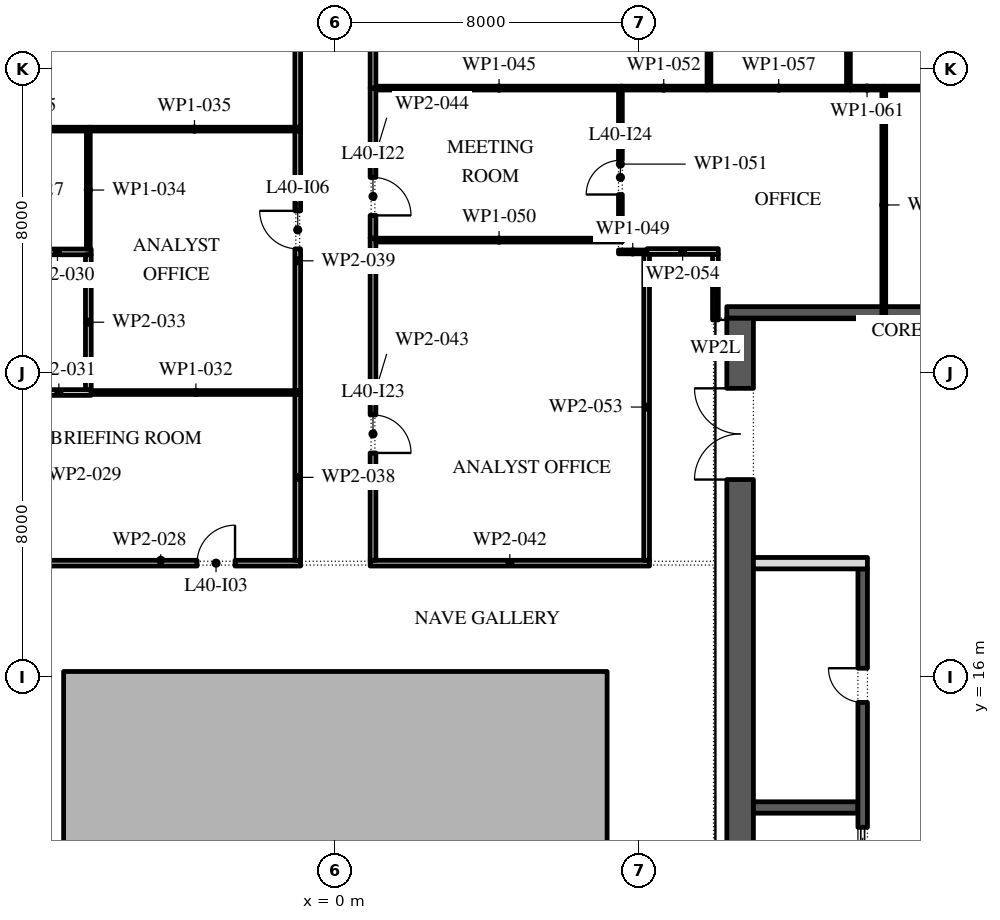
"""IFC4 building model, lengths in metres.
Left out: names, types, materials, properties, quantities, classifications, styles, units other than length and angle.
Written with IfcOpenShell. Run it as: python <this file> out.ifc"""

import sys

from ifc_helpers import new_model, si_unit, direction, frame, frame_2d, origin, place, context, subcontext, project, spatial, polyline, rectangle, outline, extrude, element, fill, save


model = new_model("IFC4")
c1 = context("Model", 3, precision=1e-05, world=origin(), true_north=direction((0.0, 1.0)))
c2 = subcontext(c1, "Body", "Model", "MODEL_VIEW")
j1 = project(units=[si_unit("LENGTHUNIT", "METRE"), si_unit("PLANEANGLEUNIT", "RADIAN")], contexts=[c1])
p1 = place(None, origin())
s1 = spatial("IfcSite", under=j1, at=p1, CompositionType="ELEMENT")
p2 = place(p1, origin())
s2 = spatial("IfcBuilding", under=s1, at=p2, CompositionType="ELEMENT")
p3 = place(p2, frame((0.0, 0.0, 184.2)))
s3 = spatial("IfcBuildingStorey", under=s2, at=p3, CompositionType="ELEMENT", Elevation=184.2)
p4 = place(p3, origin())
e1 = element("IfcWall", 1, at=p4, inside=s3, PredefinedType="STANDARD", context=c2, shape_type="SweptSolid", body=[
    extrude(outline(polyline([(-7.15, -2.15), (7.15, -2.15), (7.15, 16.15), (-7.15, 16.15), (-7.15, -2.15)]), holes=[polyline([(-7.0, -2.0), (-7.0, 16.0), (7.0, 16.0), (7.0, -2.0), (-7.0, -2.0)])]), origin(), (0.0, 0.0, 1.0), 4.0),
])
p5 = place(p3, frame((10.65, -2.45, 0.0), z_axis=(0.0, 0.0, 1.0), x_axis=(0.0, 1.0, 0.0)))
e2 = element("IfcWall", 2, at=p5, inside=s3, PredefinedType="SHEAR", context=c2, shape_type="SweptSolid", body=[
    extrude(rectangle(XDim=27.9, YDim=0.7, at=frame_2d((13.95, 0.0))), origin(), (0.0, 0.0, 1.0), 4.0),
])
p6 = place(p5, frame((23.65, 0.0, 0.0)))
e3 = element("IfcOpeningElement", 3, at=p6, cuts=e2, PredefinedType="OPENING", context=c2, shape_type="SweptSolid", body=[
    extrude(rectangle(XDim=2.4, YDim=2.1, at=frame_2d((1.2, 1.05))), frame((0.0, 0.36, 0.0), z_axis=(0.0, -1.0, 0.0), x_axis=(1.0, 0.0, 0.0)), (0.0, 0.0, 1.0), 0.72),
])
p7 = place(p5, frame((1.387, 0.0, 0.0)))
e4 = element("IfcOpeningElement", 4, at=p7, cuts=e2, PredefinedType="OPENING", context=c2, shape_type="SweptSolid", body=[
    extrude(rectangle(XDim=0.9, YDim=2.1, at=frame_2d((0.45, 1.05))), frame((0.0, 0.36, 0.0), z_axis=(0.0, -1.0, 0.0), x_axis=(1.0, 0.0, 0.0)), (0.0, 0.0, 1.0), 0.72),
])
p8 = place(p5, frame((4.562, 0.0, 0.0)))
e5 = element("IfcOpeningElement", 5, at=p8, cuts=e2, PredefinedType="OPENING", context=c2, shape_type="SweptSolid", body=[
    extrude(rectangle(XDim=1.0, YDim=2.1, at=frame_2d((0.5, 1.05))), frame((0.0, 0.36, 0.0), z_axis=(0.0, -1.0, 0.0), x_axis=(1.0, 0.0, 0.0)), (0.0, 0.0, 1.0), 0.72),
])
p9 = place(p3, frame((10.3, 25.6, 0.0), z_axis=(0.0, 0.0, 1.0), x_axis=(1.0, 0.0, 0.0)))
e6 = element("IfcWall", 6, at=p9, inside=s3, PredefinedType="SHEAR", context=c2, shape_type="SweptSolid", body=[
    extrude(rectangle(XDim=11.4, YDim=0.3, at=frame_2d((5.7, 0.0))), origin(), (0.0, 0.0, 1.0), 4.0),
])
p10 = place(p3, frame((11.0, 12.571, 0.0), z_axis=(0.0, 0.0, 1.0), x_axis=(1.0, 0.0, 0.0)))
e7 = element("IfcWall", 7, at=p10, inside=s3, PredefinedType="SHEAR", context=c2, shape_type="SweptSolid", body=[
    extrude(rectangle(XDim=2.75, YDim=0.3, at=frame_2d((1.375, 0.0))), origin(), (0.0, 0.0, 1.0), 4.0),
])
p11 = place(p3, frame((13.875, -2.45, 0.0), z_axis=(0.0, 0.0, 1.0), x_axis=(0.0, 1.0, 0.0)))
e8 = element("IfcWall", 8, at=p11, inside=s3, PredefinedType="SHEAR", context=c2, shape_type="SweptSolid", body=[
    extrude(rectangle(XDim=21.3, YDim=0.25, at=frame_2d((10.65, 0.0))), origin(), (0.0, 0.0, 1.0), 4.0),
])
p12 = place(p11, frame((17.786, 0.0, 0.0)))
e9 = element("IfcOpeningElement", 9, at=p12, cuts=e8, PredefinedType="OPENING", context=c2, shape_type="SweptSolid", body=[
    extrude(rectangle(XDim=0.9, YDim=2.1, at=frame_2d((0.45, 1.05))), frame((0.0, 0.135, 0.0), z_axis=(0.0, -1.0, 0.0), x_axis=(1.0, 0.0, 0.0)), (0.0, 0.0, 1.0), 0.27),
])
p13 = place(p11, frame((6.971, 0.0, 0.0)))
e10 = element("IfcOpeningElement", 10, at=p13, cuts=e8, PredefinedType="OPENING", context=c2, shape_type="SweptSolid", body=[
    extrude(rectangle(XDim=1.1, YDim=2.1, at=frame_2d((0.55, 1.05))), frame((0.0, 0.135, 0.0), z_axis=(0.0, -1.0, 0.0), x_axis=(1.0, 0.0, 0.0)), (0.0, 0.0, 1.0), 0.27),
])
p14 = place(p11, frame((9.114, 0.0, 0.0)))
e11 = element("IfcOpeningElement", 11, at=p14, cuts=e8, PredefinedType="OPENING", context=c2, shape_type="SweptSolid", body=[
    extrude(rectangle(XDim=1.1, YDim=2.1, at=frame_2d((0.55, 1.05))), frame((0.0, 0.135, 0.0), z_axis=(0.0, -1.0, 0.0), x_axis=(1.0, 0.0, 0.0)), (0.0, 0.0, 1.0), 0.27),
])
p15 = place(p11, frame((11.257, 0.0, 0.0)))
e12 = element("IfcOpeningElement", 12, at=p15, cuts=e8, PredefinedType="OPENING", context=c2, shape_type="SweptSolid", body=[
    extrude(rectangle(XDim=1.1, YDim=2.1, at=frame_2d((0.55, 1.05))), frame((0.0, 0.135, 0.0), z_axis=(0.0, -1.0, 0.0), x_axis=(1.0, 0.0, 0.0)), (0.0, 0.0, 1.0), 0.27),
])
p16 = place(p11, frame((13.4, 0.0, 0.0)))
e13 = element("IfcOpeningElement", 13, at=p16, cuts=e8, PredefinedType="OPENING", context=c2, shape_type="SweptSolid", body=[
    extrude(rectangle(XDim=1.1, YDim=2.1, at=frame_2d((0.55, 1.05))), frame((0.0, 0.135, 0.0), z_axis=(0.0, -1.0, 0.0), x_axis=(1.0, 0.0, 0.0)), (0.0, 0.0, 1.0), 0.27),
])
p17 = place(p3, frame((11.0, 19.0, 0.0), z_axis=(0.0, 0.0, 1.0), x_axis=(1.0, 0.0, 0.0)))
e14 = element("IfcWall", 14, at=p17, inside=s3, PredefinedType="PARTITIONING", context=c2, shape_type="SweptSolid", body=[
    extrude(rectangle(XDim=3.0, YDim=0.3, at=frame_2d((1.5, 0.0))), origin(), (0.0, 0.0, 1.0), 4.0),
])
p18 = place(p3, frame((-9.78, 30.42, 0.0), z_axis=(0.0, 0.0, 1.0), x_axis=(1.0, 0.0, 0.0)))
e15 = element("IfcWall", 15, at=p18, inside=s3, PredefinedType="PARTITIONING", context=c2, shape_type="SweptSolid", body=[
    extrude(rectangle(XDim=3.33, YDim=0.1, at=frame_2d((1.665, 0.0))), origin(), (0.0, 0.0, 1.0), 4.0),
])
p19 = place(p18, frame((1.15, 0.0, 0.0)))
e16 = element("IfcOpeningElement", 16, at=p19, cuts=e15, PredefinedType="OPENING", context=c2, shape_type="SweptSolid", body=[
    extrude(rectangle(XDim=0.9, YDim=2.1, at=frame_2d((0.45, 1.05))), frame((0.0, 0.06, 0.0), z_axis=(0.0, -1.0, 0.0), x_axis=(1.0, 0.0, 0.0)), (0.0, 0.0, 1.0), 0.12),
])
p20 = place(p3, frame((-8.275, 19.0, 0.0), z_axis=(0.0, 0.0, 1.0), x_axis=(1.0, 0.0, 0.0)))
e17 = element("IfcWall", 17, at=p20, inside=s3, PredefinedType="PARTITIONING", context=c2, shape_type="SweptSolid", body=[
    extrude(rectangle(XDim=7.36, YDim=0.15, at=frame_2d((3.68, 0.0))), origin(), (0.0, 0.0, 1.0), 4.0),
])
p21 = place(p20, frame((4.635, 0.0, 0.0)))
e18 = element("IfcOpeningElement", 18, at=p21, cuts=e17, PredefinedType="OPENING", context=c2, shape_type="SweptSolid", body=[
    extrude(rectangle(XDim=1.0, YDim=2.1, at=frame_2d((0.5, 1.05))), frame((0.0, 0.085, 0.0), z_axis=(0.0, -1.0, 0.0), x_axis=(1.0, 0.0, 0.0)), (0.0, 0.0, 1.0), 0.17),
])
p22 = place(p3, frame((-8.2, 27.19, 0.0), z_axis=(0.0, 0.0, 1.0), x_axis=(1.0, 0.0, 0.0)))
e19 = element("IfcWall", 19, at=p22, inside=s3, PredefinedType="PARTITIONING", context=c2, shape_type="SweptSolid", body=[
    extrude(rectangle(XDim=1.775, YDim=0.15, at=frame_2d((0.887, 0.0))), origin(), (0.0, 0.0, 1.0), 4.0),
])
p23 = place(p3, frame((-6.425, 23.49, 0.0), z_axis=(0.0, 0.0, 1.0), x_axis=(-1.0, 0.0, 0.0)))
e20 = element("IfcWall", 20, at=p23, inside=s3, PredefinedType="PARTITIONING", context=c2, shape_type="SweptSolid", body=[
    extrude(rectangle(XDim=1.7, YDim=0.15, at=frame_2d((0.85, 0.0))), origin(), (0.0, 0.0, 1.0), 4.0),
])
p24 = place(p3, frame((-6.425, 23.49, 0.0), z_axis=(0.0, 0.0, 1.0), x_axis=(1.0, 0.0, 0.0)))
e21 = element("IfcWall", 21, at=p24, inside=s3, PredefinedType="PARTITIONING", context=c2, shape_type="SweptSolid", body=[
    extrude(rectangle(XDim=5.51, YDim=0.1, at=frame_2d((2.755, 0.0))), origin(), (0.0, 0.0, 1.0), 4.0),
])
p25 = place(p3, frame((-6.5, 27.115, 0.0), z_axis=(0.0, 0.0, 1.0), x_axis=(0.0, -1.0, 0.0)))
e22 = element("IfcWall", 22, at=p25, inside=s3, PredefinedType="PARTITIONING", context=c2, shape_type="SweptSolid", body=[
    extrude(rectangle(XDim=3.55, YDim=0.15, at=frame_2d((1.775, 0.0))), origin(), (0.0, 0.0, 1.0), 4.0),
])
p26 = place(p3, frame((-6.5, 30.37, 0.0), z_axis=(0.0, 0.0, 1.0), x_axis=(0.0, -1.0, 0.0)))
e23 = element("IfcWall", 23, at=p26, inside=s3, PredefinedType="PARTITIONING", context=c2, shape_type="SweptSolid", body=[
    extrude(rectangle(XDim=3.105, YDim=0.1, at=frame_2d((1.553, 0.0))), origin(), (0.0, 0.0, 1.0), 4.0),
])
p27 = place(p3, frame((-6.5, 30.42, 0.0), z_axis=(0.0, 0.0, 1.0), x_axis=(1.0, 0.0, 0.0)))
e24 = element("IfcWall", 24, at=p27, inside=s3, PredefinedType="PARTITIONING", context=c2, shape_type="SweptSolid", body=[
    extrude(rectangle(XDim=5.585, YDim=0.1, at=frame_2d((2.792, 0.0))), origin(), (0.0, 0.0, 1.0), 4.0),
])
p28 = place(p3, frame((-0.99, 19.075, 0.0), z_axis=(0.0, 0.0, 1.0), x_axis=(0.0, 1.0, 0.0)))
e25 = element("IfcWall", 25, at=p28, inside=s3, PredefinedType="PARTITIONING", context=c2, shape_type="SweptSolid", body=[
    extrude(rectangle(XDim=4.365, YDim=0.15, at=frame_2d((2.183, 0.0))), origin(), (0.0, 0.0, 1.0), 4.0),
])
p29 = place(p3, frame((-0.99, 23.54, 0.0), z_axis=(0.0, 0.0, 1.0), x_axis=(0.0, 1.0, 0.0)))
e26 = element("IfcWall", 26, at=p29, inside=s3, PredefinedType="PARTITIONING", context=c2, shape_type="SweptSolid", body=[
    extrude(rectangle(XDim=6.83, YDim=0.15, at=frame_2d((3.415, 0.0))), origin(), (0.0, 0.0, 1.0), 4.0),
])
p30 = place(p29, frame((3.73, 0.0, 0.0)))
e27 = element("IfcOpeningElement", 27, at=p30, cuts=e26, PredefinedType="OPENING", context=c2, shape_type="SweptSolid", body=[
    extrude(rectangle(XDim=1.0, YDim=2.1, at=frame_2d((0.5, 1.05))), frame((0.0, 0.085, 0.0), z_axis=(0.0, -1.0, 0.0), x_axis=(1.0, 0.0, 0.0)), (0.0, 0.0, 1.0), 0.17),
])
p31 = place(p3, frame((-0.99, 30.47, 0.0), z_axis=(0.0, 0.0, 1.0), x_axis=(0.0, 1.0, 0.0)))
e28 = element("IfcWall", 28, at=p31, inside=s3, PredefinedType="PARTITIONING", context=c2, shape_type="SweptSolid", body=[
    extrude(rectangle(XDim=10.826, YDim=0.15, at=frame_2d((5.413, 0.0))), origin(), (0.0, 0.0, 1.0), 4.0),
])
p32 = place(p31, frame((3.9, 0.0, 0.0)))
e29 = element("IfcOpeningElement", 29, at=p32, cuts=e28, PredefinedType="OPENING", context=c2, shape_type="SweptSolid", body=[
    extrude(rectangle(XDim=1.0, YDim=2.1, at=frame_2d((0.5, 1.05))), frame((0.0, 0.085, 0.0), z_axis=(0.0, -1.0, 0.0), x_axis=(1.0, 0.0, 0.0)), (0.0, 0.0, 1.0), 0.17),
])
p33 = place(p3, frame((0.915, 19.0, 0.0), z_axis=(0.0, 0.0, 1.0), x_axis=(1.0, 0.0, 0.0)))
e30 = element("IfcWall", 30, at=p33, inside=s3, PredefinedType="PARTITIONING", context=c2, shape_type="SweptSolid", body=[
    extrude(rectangle(XDim=7.35, YDim=0.15, at=frame_2d((3.675, 0.0))), origin(), (0.0, 0.0, 1.0), 4.0),
])
p34 = place(p3, frame((0.99, 27.55, 0.0), z_axis=(0.0, 0.0, 1.0), x_axis=(0.0, -1.0, 0.0)))
e31 = element("IfcWall", 31, at=p34, inside=s3, PredefinedType="PARTITIONING", context=c2, shape_type="SweptSolid", body=[
    extrude(rectangle(XDim=8.475, YDim=0.15, at=frame_2d((4.238, 0.0))), origin(), (0.0, 0.0, 1.0), 4.0),
])
p35 = place(p34, frame((4.65, 0.0, 0.0)))
e32 = element("IfcOpeningElement", 32, at=p35, cuts=e31, PredefinedType="OPENING", context=c2, shape_type="SweptSolid", body=[
    extrude(rectangle(XDim=1.0, YDim=2.1, at=frame_2d((0.5, 1.05))), frame((0.0, 0.085, 0.0), z_axis=(0.0, -1.0, 0.0), x_axis=(1.0, 0.0, 0.0)), (0.0, 0.0, 1.0), 0.17),
])
p36 = place(p3, frame((0.99, 31.5, 0.0), z_axis=(0.0, 0.0, 1.0), x_axis=(0.0, -1.0, 0.0)))
e33 = element("IfcWall", 33, at=p36, inside=s3, PredefinedType="PARTITIONING", context=c2, shape_type="SweptSolid", body=[
    extrude(rectangle(XDim=3.95, YDim=0.15, at=frame_2d((1.975, 0.0))), origin(), (0.0, 0.0, 1.0), 4.0),
])
p37 = place(p36, frame((2.35, 0.0, 0.0)))
e34 = element("IfcOpeningElement", 34, at=p37, cuts=e33, PredefinedType="OPENING", context=c2, shape_type="SweptSolid", body=[
    extrude(rectangle(XDim=1.0, YDim=2.1, at=frame_2d((0.5, 1.05))), frame((0.0, 0.085, 0.0), z_axis=(0.0, -1.0, 0.0), x_axis=(1.0, 0.0, 0.0)), (0.0, 0.0, 1.0), 0.17),
])
p38 = place(p3, frame((1.065, 31.5, 0.0), z_axis=(0.0, 0.0, 1.0), x_axis=(1.0, 0.0, 0.0)))
e35 = element("IfcWall", 35, at=p38, inside=s3, PredefinedType="PARTITIONING", context=c2, shape_type="SweptSolid", body=[
    extrude(rectangle(XDim=6.485, YDim=0.1, at=frame_2d((3.243, 0.0))), origin(), (0.0, 0.0, 1.0), 4.0),
])
p39 = place(p3, frame((0.99, 40.05, 0.0), z_axis=(0.0, 0.0, 1.0), x_axis=(0.0, -1.0, 0.0)))
e36 = element("IfcWall", 36, at=p39, inside=s3, PredefinedType="PARTITIONING", context=c2, shape_type="SweptSolid", body=[
    extrude(rectangle(XDim=8.55, YDim=0.15, at=frame_2d((4.275, 0.0))), origin(), (0.0, 0.0, 1.0), 4.0),
])
p40 = place(p39, frame((2.9, 0.0, 0.0)))
e37 = element("IfcOpeningElement", 37, at=p40, cuts=e36, PredefinedType="OPENING", context=c2, shape_type="SweptSolid", body=[
    extrude(rectangle(XDim=1.0, YDim=2.1, at=frame_2d((0.5, 1.05))), frame((0.0, 0.085, 0.0), z_axis=(0.0, -1.0, 0.0), x_axis=(1.0, 0.0, 0.0)), (0.0, 0.0, 1.0), 0.17),
])
p41 = place(p3, frame((7.45, 27.19, 0.0), z_axis=(0.0, 0.0, 1.0), x_axis=(1.0, 0.0, 0.0)))
e38 = element("IfcWall", 38, at=p41, inside=s3, PredefinedType="PARTITIONING", context=c2, shape_type="SweptSolid", body=[
    extrude(rectangle(XDim=0.75, YDim=0.1, at=frame_2d((0.375, 0.0))), origin(), (0.0, 0.0, 1.0), 4.0),
])
p42 = place(p3, frame((7.55, 27.5, 0.0), z_axis=(0.0, 0.0, 1.0), x_axis=(-1.0, 0.0, 0.0)))
e39 = element("IfcWall", 39, at=p42, inside=s3, PredefinedType="PARTITIONING", context=c2, shape_type="SweptSolid", body=[
    extrude(rectangle(XDim=6.485, YDim=0.1, at=frame_2d((3.243, 0.0))), origin(), (0.0, 0.0, 1.0), 4.0),
])
p43 = place(p3, frame((7.5, 31.45, 0.0), z_axis=(0.0, 0.0, 1.0), x_axis=(0.0, -1.0, 0.0)))
e40 = element("IfcWall", 40, at=p43, inside=s3, PredefinedType="PARTITIONING", context=c2, shape_type="SweptSolid", body=[
    extrude(rectangle(XDim=3.9, YDim=0.1, at=frame_2d((1.95, 0.0))), origin(), (0.0, 0.0, 1.0), 4.0),
])
p44 = place(p43, frame((1.85, 0.0, 0.0)))
e41 = element("IfcOpeningElement", 41, at=p44, cuts=e40, PredefinedType="OPENING", context=c2, shape_type="SweptSolid", body=[
    extrude(rectangle(XDim=0.9, YDim=2.1, at=frame_2d((0.45, 1.05))), frame((0.0, 0.06, 0.0), z_axis=(0.0, -1.0, 0.0), x_axis=(1.0, 0.0, 0.0)), (0.0, 0.0, 1.0), 0.12),
])
p45 = place(p3, frame((7.5, 31.5, 0.0), z_axis=(0.0, 0.0, 1.0), x_axis=(1.0, 0.0, 0.0)))
e42 = element("IfcWall", 42, at=p45, inside=s3, PredefinedType="PARTITIONING", context=c2, shape_type="SweptSolid", body=[
    extrude(rectangle(XDim=2.28, YDim=0.1, at=frame_2d((1.14, 0.0))), origin(), (0.0, 0.0, 1.0), 4.0),
])
p46 = place(p3, frame((8.19, 19.075, 0.0), z_axis=(0.0, 0.0, 1.0), x_axis=(0.0, 1.0, 0.0)))
e43 = element("IfcWall", 43, at=p46, inside=s3, PredefinedType="PARTITIONING", context=c2, shape_type="SweptSolid", body=[
    extrude(rectangle(XDim=8.065, YDim=0.15, at=frame_2d((4.032, 0.0))), origin(), (0.0, 0.0, 1.0), 4.0),
])
p47 = place(p3, frame((8.2, 27.2, 0.0), z_axis=(0.0, 0.0, 1.0), x_axis=(1.0, 0.0, 0.0)))
e44 = element("IfcWall", 44, at=p47, inside=s3, PredefinedType="PARTITIONING", context=c2, shape_type="SweptSolid", body=[
    extrude(rectangle(XDim=1.875, YDim=0.15, at=frame_2d((0.938, 0.0))), origin(), (0.0, 0.0, 1.0), 4.0),
])
p48 = place(p3, frame((9.78, 31.5, 0.0), z_axis=(0.0, 0.0, 1.0), x_axis=(1.0, 0.0, 0.0)))
e45 = element("IfcWall", 45, at=p48, inside=s3, PredefinedType="PARTITIONING", context=c2, shape_type="SweptSolid", body=[
    extrude(rectangle(XDim=3.77, YDim=0.1, at=frame_2d((1.885, 0.0))), origin(), (0.0, 0.0, 1.0), 4.0),
])
p49 = place(p3, frame((9.83, 39.95, 0.0), z_axis=(0.0, 0.0, 1.0), x_axis=(0.0, -1.0, 0.0)))
e46 = element("IfcWall", 46, at=p49, inside=s3, PredefinedType="PARTITIONING", context=c2, shape_type="SweptSolid", body=[
    extrude(rectangle(XDim=8.4, YDim=0.1, at=frame_2d((4.2, 0.0))), origin(), (0.0, 0.0, 1.0), 4.0),
])
p50 = place(p49, frame((4.6, 0.0, 0.0)))
e47 = element("IfcOpeningElement", 47, at=p50, cuts=e46, PredefinedType="OPENING", context=c2, shape_type="SweptSolid", body=[
    extrude(rectangle(XDim=0.9, YDim=2.1, at=frame_2d((0.45, 1.05))), frame((0.0, 0.06, 0.0), z_axis=(0.0, -1.0, 0.0), x_axis=(1.0, 0.0, 0.0)), (0.0, 0.0, 1.0), 0.12),
])
p51 = place(p3, frame((10.0, 27.125, 0.0), z_axis=(0.0, 0.0, 1.0), x_axis=(0.0, -1.0, 0.0)))
e48 = element("IfcWall", 48, at=p51, inside=s3, PredefinedType="PARTITIONING", context=c2, shape_type="SweptSolid", body=[
    extrude(rectangle(XDim=1.725, YDim=0.15, at=frame_2d((0.863, 0.0))), origin(), (0.0, 0.0, 1.0), 3.02),
])
p52 = place(p3, frame((13.55, 31.5, 0.0), z_axis=(0.0, 0.0, 1.0), x_axis=(1.0, 0.0, 0.0)))
e49 = element("IfcWall", 49, at=p52, inside=s3, PredefinedType="PARTITIONING", context=c2, shape_type="SweptSolid", body=[
    extrude(rectangle(XDim=0.88, YDim=0.1, at=frame_2d((0.44, 0.0))), origin(), (0.0, 0.0, 1.0), 4.0),
])
p53 = place(p3, frame((13.5, 39.95, 0.0), z_axis=(0.0, 0.0, 1.0), x_axis=(0.0, -1.0, 0.0)))
e50 = element("IfcWall", 50, at=p53, inside=s3, PredefinedType="PARTITIONING", context=c2, shape_type="SweptSolid", body=[
    extrude(rectangle(XDim=8.4, YDim=0.1, at=frame_2d((4.2, 0.0))), origin(), (0.0, 0.0, 1.0), 4.0),
])
p54 = place(p3, frame((14.43, 31.45, 0.0), z_axis=(0.0, 0.0, 1.0), x_axis=(0.0, -1.0, 0.0)))
e51 = element("IfcWall", 51, at=p54, inside=s3, PredefinedType="PARTITIONING", context=c2, shape_type="SweptSolid", body=[
    extrude(rectangle(XDim=6.05, YDim=0.1, at=frame_2d((3.025, 0.0))), origin(), (0.0, 0.0, 1.0), 4.0),
])
p55 = place(p3, frame((14.43, 31.5, 0.0), z_axis=(0.0, 0.0, 1.0), x_axis=(1.0, 0.0, 0.0)))
e52 = element("IfcWall", 52, at=p55, inside=s3, PredefinedType="PARTITIONING", context=c2, shape_type="SweptSolid", body=[
    extrude(rectangle(XDim=8.14, YDim=0.1, at=frame_2d((4.07, 0.0))), origin(), (0.0, 0.0, 1.0), 4.0),
])
p56 = place(p12, origin())
e53 = element("IfcDoor", 53, at=p56, inside=s3, OperationType="SINGLE_SWING_LEFT", PredefinedType="DOOR", context=c2, shape_type="SweptSolid", body=[
    extrude(rectangle(XDim=0.9, YDim=2.1, at=frame_2d((0.45, 1.05))), frame((0.0, 0.125, 0.0), z_axis=(0.0, -1.0, 0.0), x_axis=(1.0, 0.0, 0.0)), (0.0, 0.0, 1.0), 0.05),
])
fill(e9, e53)
p57 = place(p16, origin())
e54 = element("IfcDoor", 54, at=p57, inside=s3, OperationType="SLIDING_TO_LEFT", PredefinedType="DOOR", context=c2, shape_type="SweptSolid", body=[
    extrude(rectangle(XDim=1.1, YDim=2.1, at=frame_2d((0.55, 1.05))), frame((0.0, 0.025, 0.0), z_axis=(0.0, -1.0, 0.0), x_axis=(1.0, 0.0, 0.0)), (0.0, 0.0, 1.0), 0.05),
])
fill(e13, e54)
p58 = place(p6, origin())
e55 = element("IfcDoor", 55, at=p58, inside=s3, OperationType="DOUBLE_DOOR_SINGLE_SWING", PredefinedType="DOOR", context=c2, shape_type="SweptSolid", body=[
    extrude(rectangle(XDim=2.4, YDim=2.1, at=frame_2d((1.2, 1.05))), frame((0.0, 0.025, 0.0), z_axis=(0.0, -1.0, 0.0), x_axis=(1.0, 0.0, 0.0)), (0.0, 0.0, 1.0), 0.05),
])
fill(e3, e55)
p59 = place(p21, origin())
e56 = element("IfcDoor", 56, at=p59, inside=s3, OperationType="SINGLE_SWING_LEFT", PredefinedType="DOOR", context=c2, shape_type="SweptSolid", body=[
    extrude(rectangle(XDim=1.0, YDim=2.1, at=frame_2d((0.5, 1.05))), frame((0.0, 0.025, 0.0), z_axis=(0.0, -1.0, 0.0), x_axis=(1.0, 0.0, 0.0)), (0.0, 0.0, 1.0), 0.05),
])
fill(e18, e56)
p60 = place(p30, origin())
e57 = element("IfcDoor", 57, at=p60, inside=s3, OperationType="SINGLE_SWING_LEFT", PredefinedType="DOOR", context=c2, shape_type="SweptSolid", body=[
    extrude(rectangle(XDim=1.0, YDim=2.1, at=frame_2d((0.5, 1.05))), frame((0.0, 0.025, 0.0), z_axis=(0.0, -1.0, 0.0), x_axis=(1.0, 0.0, 0.0)), (0.0, 0.0, 1.0), 0.05),
])
fill(e27, e57)
p61 = place(p37, origin())
e58 = element("IfcDoor", 58, at=p61, inside=s3, OperationType="SINGLE_SWING_LEFT", PredefinedType="DOOR", context=c2, shape_type="SweptSolid", body=[
    extrude(rectangle(XDim=1.0, YDim=2.1, at=frame_2d((0.5, 1.05))), frame((0.0, 0.025, 0.0), z_axis=(0.0, -1.0, 0.0), x_axis=(1.0, 0.0, 0.0)), (0.0, 0.0, 1.0), 0.05),
])
fill(e34, e58)
p62 = place(p35, origin())
e59 = element("IfcDoor", 59, at=p62, inside=s3, OperationType="SINGLE_SWING_LEFT", PredefinedType="DOOR", context=c2, shape_type="SweptSolid", body=[
    extrude(rectangle(XDim=1.0, YDim=2.1, at=frame_2d((0.5, 1.05))), frame((0.0, 0.025, 0.0), z_axis=(0.0, -1.0, 0.0), x_axis=(1.0, 0.0, 0.0)), (0.0, 0.0, 1.0), 0.05),
])
fill(e32, e59)
p63 = place(p44, frame((0.9, 0.0, 0.0), z_axis=(0.0, 0.0, 1.0), x_axis=(-1.0, 0.0, 0.0)))
e60 = element("IfcDoor", 60, at=p63, inside=s3, OperationType="SINGLE_SWING_RIGHT", PredefinedType="DOOR", context=c2, shape_type="SweptSolid", body=[
    extrude(rectangle(XDim=0.9, YDim=2.1, at=frame_2d((0.45, 1.05))), frame((0.0, 0.025, 0.0), z_axis=(0.0, -1.0, 0.0), x_axis=(1.0, 0.0, 0.0)), (0.0, 0.0, 1.0), 0.05),
])
fill(e41, e60)
save(model, sys.argv[1])
